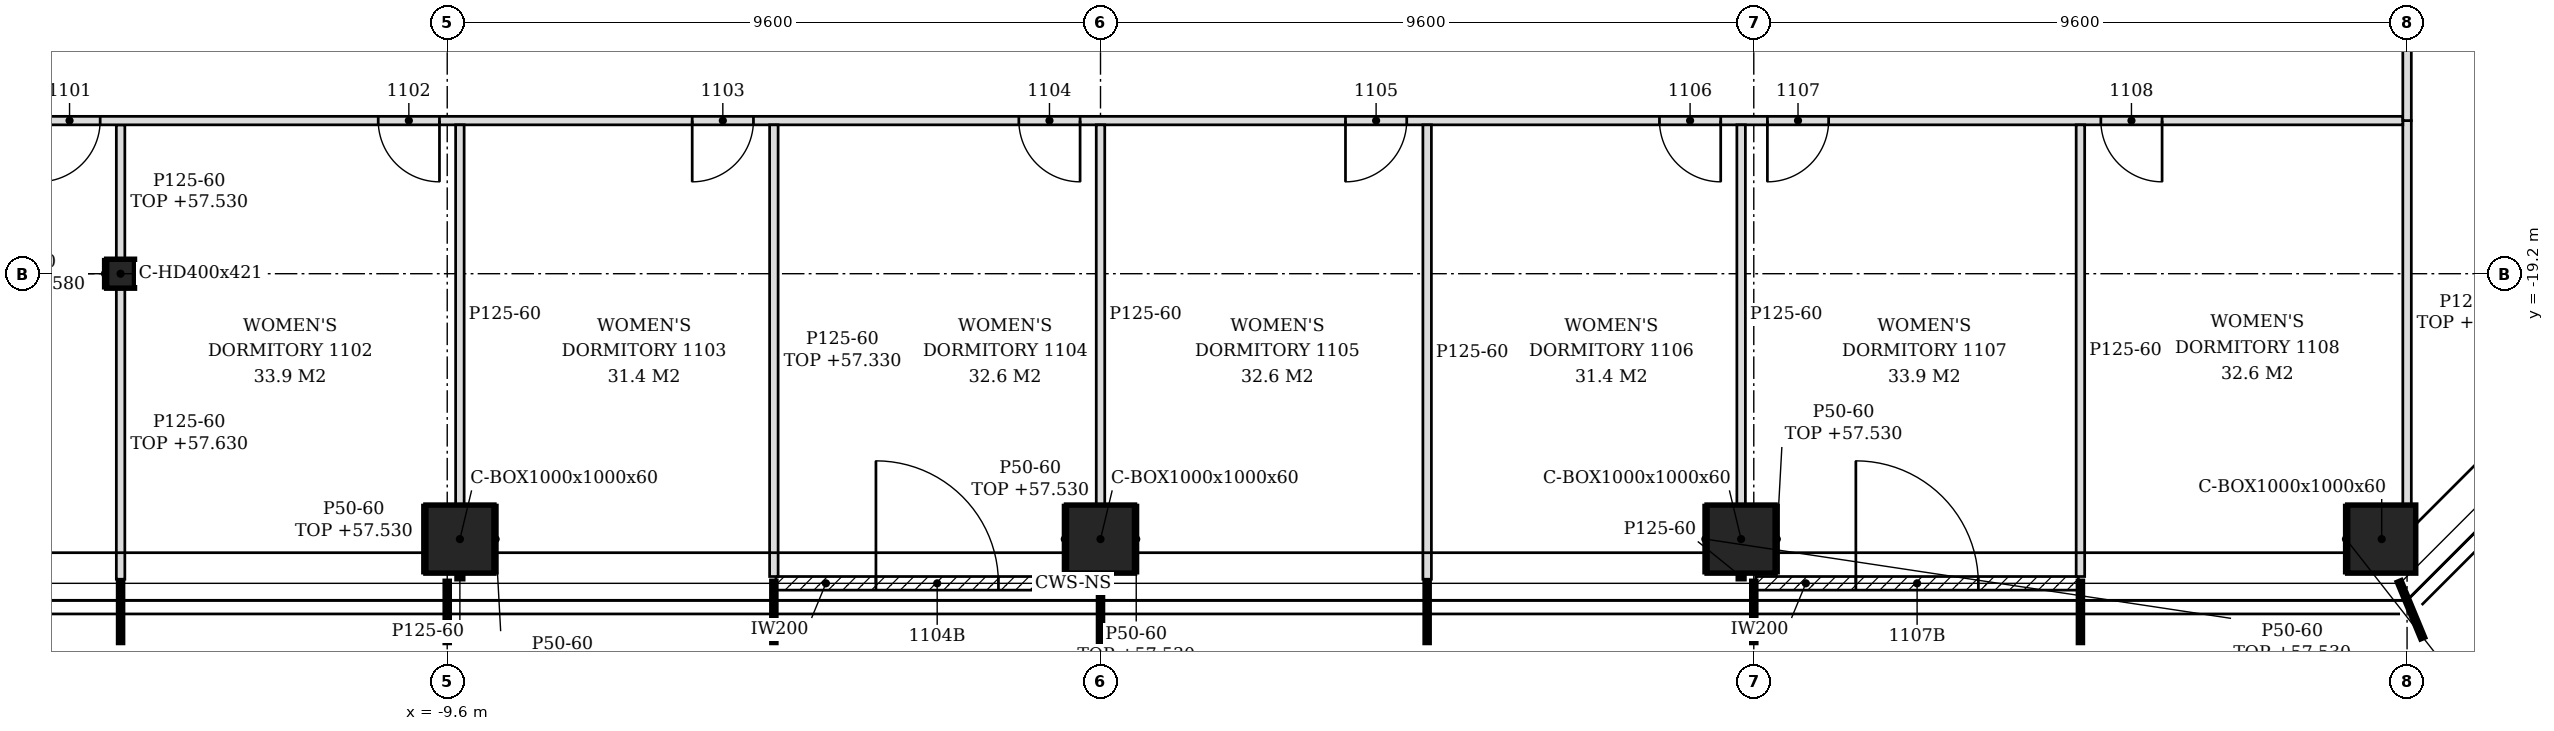
"""IFC4 building model, lengths in metres.
Left out: names, types, materials, properties, quantities, classifications, styles, units other than length and angle.
Written with IfcOpenShell. Run it as: python <this file> out.ifc"""

import sys

from ifc_helpers import new_model, si_unit, direction, frame, frame_2d, origin, origin_2d, place, context, subcontext, project, spatial, polyline, rectangle, hollow_rectangle, i_section, outline, extrude, element, fill, save


model = new_model("IFC4")
c1 = context("Model", 3, precision=1e-05, world=origin(), true_north=direction((0.0, 1.0)))
c2 = subcontext(c1, "Body", "Model", "MODEL_VIEW")
j1 = project(units=[si_unit("LENGTHUNIT", "METRE"), si_unit("PLANEANGLEUNIT", "RADIAN")], contexts=[c1])
p1 = place(None, origin())
s1 = spatial("IfcSite", under=j1, at=p1, CompositionType="ELEMENT")
p2 = place(p1, origin())
s2 = spatial("IfcBuilding", under=s1, at=p2, CompositionType="ELEMENT")
p3 = place(p2, frame((0.0, 0.0, 54.6)))
s3 = spatial("IfcBuildingStorey", under=s2, at=p3, CompositionType="ELEMENT", Elevation=54.6)
for number, where, z_axis, x_axis in (
    (1, (-9.414, -23.1, -0.15), (0.0, 0.0, 1.0), (1.0, 0.0, 0.0)),
    (2, (0.0, -23.1, -0.15), (0.0, 0.0, 1.0), (1.0, 0.0, 0.0)),
    (3, (9.414, -23.1, -0.15), (0.0, 0.0, 1.0), (1.0, 0.0, 0.0)),
    (4, (18.827, -23.1, -0.15), (0.0, 0.0, 1.0), (1.0, 0.0, 0.0)),
):
    element("IfcColumn", number, at=place(p3, frame(where, z_axis=z_axis, x_axis=x_axis)), inside=s3, PredefinedType="COLUMN", context=c2, shape_type="SweptSolid", body=[
        extrude(hollow_rectangle(XDim=1.0, YDim=1.0, WallThickness=0.06, at=origin_2d()), origin(), (0.0, 0.0, 1.0), 3.6),
    ])
p4 = place(p3, frame((-14.4, -19.2, -0.15), z_axis=(0.0, 0.0, 1.0), x_axis=(1.0, 0.0, 0.0)))
e5 = element("IfcColumn", 5, at=p4, inside=s3, PredefinedType="COLUMN", context=c2, shape_type="SweptSolid", body=[
    extrude(i_section(OverallWidth=0.409, OverallDepth=0.425, WebThickness=0.033, FlangeThickness=0.052, FilletRadius=0.015, at=origin_2d()), origin(), (0.0, 0.0, 1.0), 3.6),
])
p5 = place(p3, frame((-4.77, -23.75, 0.0), z_axis=(0.0, 0.0, 1.0), x_axis=(1.0, 0.0, 0.0)))
e6 = element("IfcWall", 6, at=p5, inside=s3, PredefinedType="NOTDEFINED", context=c2, shape_type="SweptSolid", body=[
    extrude(rectangle(XDim=4.74, YDim=0.2, at=frame_2d((2.37, 0.0))), origin(), (0.0, 0.0, 1.0), 3.45),
])
p6 = place(p5, frame((1.47, 0.0, 0.0)))
e7 = element("IfcOpeningElement", 7, at=p6, cuts=e6, PredefinedType="OPENING", context=c2, shape_type="SweptSolid", body=[
    extrude(rectangle(XDim=1.8, YDim=2.4, at=frame_2d((0.9, 1.2))), frame((0.0, 0.11, 0.0), z_axis=(0.0, -1.0, 0.0), x_axis=(1.0, 0.0, 0.0)), (0.0, 0.0, 1.0), 0.22),
])
p7 = place(p3, frame((9.63, -23.75, 0.0), z_axis=(0.0, 0.0, 1.0), x_axis=(1.0, 0.0, 0.0)))
e8 = element("IfcWall", 8, at=p7, inside=s3, PredefinedType="NOTDEFINED", context=c2, shape_type="SweptSolid", body=[
    extrude(rectangle(XDim=4.74, YDim=0.2, at=frame_2d((2.37, 0.0))), origin(), (0.0, 0.0, 1.0), 3.45),
])
p8 = place(p7, frame((1.47, 0.0, 0.0)))
e9 = element("IfcOpeningElement", 9, at=p8, cuts=e8, PredefinedType="OPENING", context=c2, shape_type="SweptSolid", body=[
    extrude(rectangle(XDim=1.8, YDim=2.4, at=frame_2d((0.9, 1.2))), frame((0.0, 0.11, 0.0), z_axis=(0.0, -1.0, 0.0), x_axis=(1.0, 0.0, 0.0)), (0.0, 0.0, 1.0), 0.22),
])
p9 = place(p3, frame((-14.4, -23.69, 0.0), z_axis=(0.0, 0.0, 1.0), x_axis=(0.0, 1.0, 0.0)))
e10 = element("IfcWall", 10, at=p9, inside=s3, PredefinedType="PARTITIONING", context=c2, shape_type="SweptSolid", body=[
    extrude(outline(polyline([(0.0, 0.0), (4.277, 0.0), (4.278, 3.03), (0.74, 3.03), (0.738, 2.93), (0.44, 2.93), (0.438, 3.03), (0.0, 3.03), (0.0, 0.0)])), frame((0.0, 0.062, 0.0), z_axis=(0.0, -1.0, 0.0), x_axis=(1.0, 0.0, 0.0)), (0.0, 0.0, 1.0), 0.125),
])
p10 = place(p3, frame((-9.414, -23.703, 0.0), z_axis=(0.0, 0.0, 1.0), x_axis=(0.0, 1.0, 0.0)))
e11 = element("IfcWall", 11, at=p10, inside=s3, PredefinedType="PARTITIONING", context=c2, shape_type="SweptSolid", body=[
    extrude(rectangle(XDim=0.103, YDim=0.125, at=frame_2d((0.051, 0.0))), origin(), (0.0, 0.0, 1.0), 3.45),
])
p11 = place(p3, frame((-4.8, -23.65, 0.0), z_axis=(0.0, 0.0, 1.0), x_axis=(0.0, 1.0, 0.0)))
e12 = element("IfcWall", 12, at=p11, inside=s3, PredefinedType="PARTITIONING", context=c2, shape_type="SweptSolid", body=[
    extrude(rectangle(XDim=6.637, YDim=0.125, at=frame_2d((3.319, 0.0))), origin(), (0.0, 0.0, 1.0), 2.73),
])
p12 = place(p3, frame((4.8, -23.69, 0.0), z_axis=(0.0, 0.0, 1.0), x_axis=(0.0, 1.0, 0.0)))
e13 = element("IfcWall", 13, at=p12, inside=s3, PredefinedType="PARTITIONING", context=c2, shape_type="SweptSolid", body=[
    extrude(outline(polyline([(0.0, 0.0), (6.677, 0.0), (6.677, 3.45), (4.595, 3.45), (4.593, 2.88), (4.385, 2.88), (4.383, 3.45), (0.74, 3.45), (0.738, 2.93), (0.44, 2.93), (0.438, 3.45), (0.0, 3.45), (0.0, 0.0)])), frame((0.0, 0.062, 0.0), z_axis=(0.0, -1.0, 0.0), x_axis=(1.0, 0.0, 0.0)), (0.0, 0.0, 1.0), 0.125),
])
p13 = place(p3, frame((9.414, -23.703, 0.0), z_axis=(0.0, 0.0, 1.0), x_axis=(0.0, 1.0, 0.0)))
e14 = element("IfcWall", 14, at=p13, inside=s3, PredefinedType="PARTITIONING", context=c2, shape_type="SweptSolid", body=[
    extrude(rectangle(XDim=0.103, YDim=0.125, at=frame_2d((0.051, 0.0))), origin(), (0.0, 0.0, 1.0), 3.45),
])
p14 = place(p3, frame((14.4, -23.65, 0.0), z_axis=(0.0, 0.0, 1.0), x_axis=(0.0, 1.0, 0.0)))
e15 = element("IfcWall", 15, at=p14, inside=s3, PredefinedType="PARTITIONING", context=c2, shape_type="SweptSolid", body=[
    extrude(outline(polyline([(0.0, 0.0), (6.637, 0.0), (6.637, 3.45), (4.555, 3.45), (4.553, 2.88), (4.345, 2.88), (4.343, 3.45), (0.7, 3.45), (0.698, 2.93), (0.4, 2.93), (0.398, 3.45), (0.0, 3.45), (0.0, 0.0)])), frame((0.0, 0.062, 0.0), z_axis=(0.0, -1.0, 0.0), x_axis=(1.0, 0.0, 0.0)), (0.0, 0.0, 1.0), 0.125),
])
p15 = place(p3, frame((-9.414, -22.6, 0.0), z_axis=(0.0, 0.0, 1.0), x_axis=(0.0, 1.0, 0.0)))
e16 = element("IfcWall", 16, at=p15, inside=s3, PredefinedType="PARTITIONING", context=c2, shape_type="SweptSolid", body=[
    extrude(outline(polyline([(0.0, 0.0), (5.588, 0.0), (5.587, 3.45), (3.5, 3.45), (3.498, 2.93), (3.3, 2.93), (3.298, 3.45), (0.0, 3.45), (0.0, 0.0)])), frame((0.0, 0.062, 0.0), z_axis=(0.0, -1.0, 0.0), x_axis=(1.0, 0.0, 0.0)), (0.0, 0.0, 1.0), 0.125),
])
for number, where, z_axis, x_axis in (
    (17, (0.0, -22.6, 0.0), (0.0, 0.0, 1.0), (0.0, 1.0, 0.0)),
    (18, (9.414, -22.6, 0.0), (0.0, 0.0, 1.0), (0.0, 1.0, 0.0)),
):
    element("IfcWall", number, at=place(p3, frame(where, z_axis=z_axis, x_axis=x_axis)), inside=s3, PredefinedType="PARTITIONING", context=c2, shape_type="SweptSolid", body=[
        extrude(outline(polyline([(0.0, 0.0), (5.588, 0.0), (5.587, 3.45), (3.505, 3.45), (3.503, 2.88), (3.295, 2.88), (3.293, 3.45), (0.0, 3.45), (0.0, 0.0)])), frame((0.0, 0.062, 0.0), z_axis=(0.0, -1.0, 0.0), x_axis=(1.0, 0.0, 0.0)), (0.0, 0.0, 1.0), 0.125),
    ])
p16 = place(p3, frame((19.2, -22.6, 0.0), z_axis=(0.0, 0.0, 1.0), x_axis=(0.0, 1.0, 0.0)))
e19 = element("IfcWall", 19, at=p16, inside=s3, PredefinedType="PARTITIONING", context=c2, shape_type="SweptSolid", body=[
    extrude(outline(polyline([(0.0, 0.0), (5.65, 0.0), (5.65, 2.73), (0.43, 2.73), (0.428, 2.63), (0.0, 2.63), (0.0, 0.0)])), frame((0.0, 0.062, 0.0), z_axis=(0.0, -1.0, 0.0), x_axis=(1.0, 0.0, 0.0)), (0.0, 0.0, 1.0), 0.125),
])
p17 = place(p3, frame((-14.4, -18.988, 0.0), z_axis=(0.0, 0.0, 1.0), x_axis=(0.0, 1.0, 0.0)))
e20 = element("IfcWall", 20, at=p17, inside=s3, PredefinedType="PARTITIONING", context=c2, shape_type="SweptSolid", body=[
    extrude(rectangle(XDim=1.975, YDim=0.125, at=frame_2d((0.988, 0.0))), origin(), (0.0, 0.0, 1.0), 2.93),
])
p18 = place(p3, frame((-21.35, -16.95, 0.0), z_axis=(0.0, 0.0, 1.0), x_axis=(1.0, 0.0, 0.0)))
e21 = element("IfcWall", 21, at=p18, inside=s3, PredefinedType="PARTITIONING", context=c2, shape_type="SweptSolid", body=[
    extrude(outline(polyline([(0.0, 0.0), (40.488, 0.0), (40.488, 2.73), (40.4, 2.73), (40.398, 3.45), (28.7, 3.45), (28.698, 2.73), (28.4, 2.73), (28.398, 3.45), (16.7, 3.45), (16.698, 2.73), (16.4, 2.73), (16.398, 3.45), (7.1, 3.45), (7.098, 2.93), (6.8, 2.93), (6.798, 3.45), (0.0, 3.45), (0.0, 0.0)])), frame((0.0, 0.062, 0.0), z_axis=(0.0, -1.0, 0.0), x_axis=(1.0, 0.0, 0.0)), (0.0, 0.0, 1.0), 0.125),
])
p19 = place(p18, frame((5.75, 0.0, 0.0)))
e22 = element("IfcOpeningElement", 22, at=p19, cuts=e21, PredefinedType="OPENING", context=c2, shape_type="SweptSolid", body=[
    extrude(rectangle(XDim=0.9, YDim=2.1, at=frame_2d((0.45, 1.05))), frame((0.0, 0.073, 0.0), z_axis=(0.0, -1.0, 0.0), x_axis=(1.0, 0.0, 0.0)), (0.0, 0.0, 1.0), 0.145),
])
p20 = place(p18, frame((10.736, 0.0, 0.0)))
e23 = element("IfcOpeningElement", 23, at=p20, cuts=e21, PredefinedType="OPENING", context=c2, shape_type="SweptSolid", body=[
    extrude(rectangle(XDim=0.9, YDim=2.1, at=frame_2d((0.45, 1.05))), frame((0.0, 0.073, 0.0), z_axis=(0.0, -1.0, 0.0), x_axis=(1.0, 0.0, 0.0)), (0.0, 0.0, 1.0), 0.145),
])
p21 = place(p18, frame((15.35, 0.0, 0.0)))
e24 = element("IfcOpeningElement", 24, at=p21, cuts=e21, PredefinedType="OPENING", context=c2, shape_type="SweptSolid", body=[
    extrude(rectangle(XDim=0.9, YDim=2.1, at=frame_2d((0.45, 1.05))), frame((0.0, 0.073, 0.0), z_axis=(0.0, -1.0, 0.0), x_axis=(1.0, 0.0, 0.0)), (0.0, 0.0, 1.0), 0.145),
])
p22 = place(p18, frame((20.15, 0.0, 0.0)))
e25 = element("IfcOpeningElement", 25, at=p22, cuts=e21, PredefinedType="OPENING", context=c2, shape_type="SweptSolid", body=[
    extrude(rectangle(XDim=0.9, YDim=2.1, at=frame_2d((0.45, 1.05))), frame((0.0, 0.073, 0.0), z_axis=(0.0, -1.0, 0.0), x_axis=(1.0, 0.0, 0.0)), (0.0, 0.0, 1.0), 0.145),
])
p23 = place(p18, frame((24.95, 0.0, 0.0)))
e26 = element("IfcOpeningElement", 26, at=p23, cuts=e21, PredefinedType="OPENING", context=c2, shape_type="SweptSolid", body=[
    extrude(rectangle(XDim=0.9, YDim=2.1, at=frame_2d((0.45, 1.05))), frame((0.0, 0.073, 0.0), z_axis=(0.0, -1.0, 0.0), x_axis=(1.0, 0.0, 0.0)), (0.0, 0.0, 1.0), 0.145),
])
p24 = place(p18, frame((29.564, 0.0, 0.0)))
e27 = element("IfcOpeningElement", 27, at=p24, cuts=e21, PredefinedType="OPENING", context=c2, shape_type="SweptSolid", body=[
    extrude(rectangle(XDim=0.9, YDim=2.1, at=frame_2d((0.45, 1.05))), frame((0.0, 0.073, 0.0), z_axis=(0.0, -1.0, 0.0), x_axis=(1.0, 0.0, 0.0)), (0.0, 0.0, 1.0), 0.145),
])
p25 = place(p18, frame((31.15, 0.0, 0.0)))
e28 = element("IfcOpeningElement", 28, at=p25, cuts=e21, PredefinedType="OPENING", context=c2, shape_type="SweptSolid", body=[
    extrude(rectangle(XDim=0.9, YDim=2.1, at=frame_2d((0.45, 1.05))), frame((0.0, 0.073, 0.0), z_axis=(0.0, -1.0, 0.0), x_axis=(1.0, 0.0, 0.0)), (0.0, 0.0, 1.0), 0.145),
])
p26 = place(p18, frame((36.05, 0.0, 0.0)))
e29 = element("IfcOpeningElement", 29, at=p26, cuts=e21, PredefinedType="OPENING", context=c2, shape_type="SweptSolid", body=[
    extrude(rectangle(XDim=0.9, YDim=2.1, at=frame_2d((0.45, 1.05))), frame((0.0, 0.073, 0.0), z_axis=(0.0, -1.0, 0.0), x_axis=(1.0, 0.0, 0.0)), (0.0, 0.0, 1.0), 0.145),
])
p27 = place(p3, frame((19.2, -16.95, 0.0), z_axis=(0.0, 0.0, 1.0), x_axis=(0.0, 1.0, 0.0)))
e30 = element("IfcWall", 30, at=p27, inside=s3, PredefinedType="PARTITIONING", context=c2, shape_type="SweptSolid", body=[
    extrude(rectangle(XDim=8.313, YDim=0.125, at=frame_2d((4.156, 0.0))), origin(), (0.0, 0.0, 1.0), 2.73),
])
p28 = place(p27, frame((6.15, 0.0, 0.0)))
e31 = element("IfcOpeningElement", 31, at=p28, cuts=e30, PredefinedType="OPENING", context=c2, shape_type="SweptSolid", body=[
    extrude(rectangle(XDim=0.9, YDim=2.1, at=frame_2d((0.45, 1.05))), frame((0.0, 0.073, 0.0), z_axis=(0.0, -1.0, 0.0), x_axis=(1.0, 0.0, 0.0)), (0.0, 0.0, 1.0), 0.145),
])
p29 = place(p3, frame((-14.629, -19.413, 0.0), z_axis=(0.0, 0.0, 1.0), x_axis=(0.0, 1.0, 0.0)))
e32 = element("IfcWall", 32, at=p29, inside=s3, PredefinedType="PARTITIONING", context=c2, shape_type="SweptSolid", body=[
    extrude(rectangle(XDim=0.425, YDim=0.05, at=frame_2d((0.212, 0.0))), origin(), (0.0, 0.0, 1.0), 2.98),
])
for number, where, z_axis, x_axis in (
    (33, (-9.939, -23.6, 0.0), (0.0, 0.0, 1.0), (0.0, 1.0, 0.0)),
    (34, (-8.889, -23.6, 0.0), (0.0, 0.0, 1.0), (0.0, 1.0, 0.0)),
    (35, (-0.525, -23.6, 0.0), (0.0, 0.0, 1.0), (0.0, 1.0, 0.0)),
    (36, (0.525, -23.6, 0.0), (0.0, 0.0, 1.0), (0.0, 1.0, 0.0)),
    (37, (8.889, -23.6, 0.0), (0.0, 0.0, 1.0), (0.0, 1.0, 0.0)),
    (38, (9.939, -23.6, 0.0), (0.0, 0.0, 1.0), (0.0, 1.0, 0.0)),
    (39, (18.302, -23.6, 0.0), (0.0, 0.0, 1.0), (0.0, 1.0, 0.0)),
):
    element("IfcWall", number, at=place(p3, frame(where, z_axis=z_axis, x_axis=x_axis)), inside=s3, PredefinedType="PARTITIONING", context=c2, shape_type="SweptSolid", body=[
        extrude(rectangle(XDim=1.0, YDim=0.05, at=frame_2d((0.5, 0.0))), origin(), (0.0, 0.0, 1.0), 2.93),
    ])
p30 = place(p6, origin())
e40 = element("IfcDoor", 40, at=p30, inside=s3, OperationType="SINGLE_SWING_LEFT", PredefinedType="DOOR", context=c2, shape_type="SweptSolid", body=[
    extrude(rectangle(XDim=1.8, YDim=2.4, at=frame_2d((0.9, 1.2))), frame((0.0, 0.025, 0.0), z_axis=(0.0, -1.0, 0.0), x_axis=(1.0, 0.0, 0.0)), (0.0, 0.0, 1.0), 0.05),
])
fill(e7, e40)
p31 = place(p8, origin())
e41 = element("IfcDoor", 41, at=p31, inside=s3, OperationType="SINGLE_SWING_LEFT", PredefinedType="DOOR", context=c2, shape_type="SweptSolid", body=[
    extrude(rectangle(XDim=1.8, YDim=2.4, at=frame_2d((0.9, 1.2))), frame((0.0, 0.025, 0.0), z_axis=(0.0, -1.0, 0.0), x_axis=(1.0, 0.0, 0.0)), (0.0, 0.0, 1.0), 0.05),
])
fill(e9, e41)
p32 = place(p19, frame((0.9, 0.0, 0.0), z_axis=(0.0, 0.0, 1.0), x_axis=(-1.0, 0.0, 0.0)))
e42 = element("IfcDoor", 42, at=p32, inside=s3, OperationType="SINGLE_SWING_RIGHT", PredefinedType="DOOR", context=c2, shape_type="SweptSolid", body=[
    extrude(rectangle(XDim=0.9, YDim=2.1, at=frame_2d((0.45, 1.05))), frame((0.0, 0.025, 0.0), z_axis=(0.0, -1.0, 0.0), x_axis=(1.0, 0.0, 0.0)), (0.0, 0.0, 1.0), 0.05),
])
fill(e22, e42)
p33 = place(p20, frame((0.9, 0.0, 0.0), z_axis=(0.0, 0.0, 1.0), x_axis=(-1.0, 0.0, 0.0)))
e43 = element("IfcDoor", 43, at=p33, inside=s3, OperationType="SINGLE_SWING_LEFT", PredefinedType="DOOR", context=c2, shape_type="SweptSolid", body=[
    extrude(rectangle(XDim=0.9, YDim=2.1, at=frame_2d((0.45, 1.05))), frame((0.0, 0.025, 0.0), z_axis=(0.0, -1.0, 0.0), x_axis=(1.0, 0.0, 0.0)), (0.0, 0.0, 1.0), 0.05),
])
fill(e23, e43)
p34 = place(p21, frame((0.9, 0.0, 0.0), z_axis=(0.0, 0.0, 1.0), x_axis=(-1.0, 0.0, 0.0)))
e44 = element("IfcDoor", 44, at=p34, inside=s3, OperationType="SINGLE_SWING_RIGHT", PredefinedType="DOOR", context=c2, shape_type="SweptSolid", body=[
    extrude(rectangle(XDim=0.9, YDim=2.1, at=frame_2d((0.45, 1.05))), frame((0.0, 0.025, 0.0), z_axis=(0.0, -1.0, 0.0), x_axis=(1.0, 0.0, 0.0)), (0.0, 0.0, 1.0), 0.05),
])
fill(e24, e44)
p35 = place(p22, frame((0.9, 0.0, 0.0), z_axis=(0.0, 0.0, 1.0), x_axis=(-1.0, 0.0, 0.0)))
e45 = element("IfcDoor", 45, at=p35, inside=s3, OperationType="SINGLE_SWING_LEFT", PredefinedType="DOOR", context=c2, shape_type="SweptSolid", body=[
    extrude(rectangle(XDim=0.9, YDim=2.1, at=frame_2d((0.45, 1.05))), frame((0.0, 0.025, 0.0), z_axis=(0.0, -1.0, 0.0), x_axis=(1.0, 0.0, 0.0)), (0.0, 0.0, 1.0), 0.05),
])
fill(e25, e45)
p36 = place(p23, frame((0.9, 0.0, 0.0), z_axis=(0.0, 0.0, 1.0), x_axis=(-1.0, 0.0, 0.0)))
e46 = element("IfcDoor", 46, at=p36, inside=s3, OperationType="SINGLE_SWING_RIGHT", PredefinedType="DOOR", context=c2, shape_type="SweptSolid", body=[
    extrude(rectangle(XDim=0.9, YDim=2.1, at=frame_2d((0.45, 1.05))), frame((0.0, 0.025, 0.0), z_axis=(0.0, -1.0, 0.0), x_axis=(1.0, 0.0, 0.0)), (0.0, 0.0, 1.0), 0.05),
])
fill(e26, e46)
p37 = place(p24, frame((0.9, 0.0, 0.0), z_axis=(0.0, 0.0, 1.0), x_axis=(-1.0, 0.0, 0.0)))
e47 = element("IfcDoor", 47, at=p37, inside=s3, OperationType="SINGLE_SWING_LEFT", PredefinedType="DOOR", context=c2, shape_type="SweptSolid", body=[
    extrude(rectangle(XDim=0.9, YDim=2.1, at=frame_2d((0.45, 1.05))), frame((0.0, 0.025, 0.0), z_axis=(0.0, -1.0, 0.0), x_axis=(1.0, 0.0, 0.0)), (0.0, 0.0, 1.0), 0.05),
])
fill(e27, e47)
p38 = place(p25, frame((0.9, 0.0, 0.0), z_axis=(0.0, 0.0, 1.0), x_axis=(-1.0, 0.0, 0.0)))
e48 = element("IfcDoor", 48, at=p38, inside=s3, OperationType="SINGLE_SWING_RIGHT", PredefinedType="DOOR", context=c2, shape_type="SweptSolid", body=[
    extrude(rectangle(XDim=0.9, YDim=2.1, at=frame_2d((0.45, 1.05))), frame((0.0, 0.025, 0.0), z_axis=(0.0, -1.0, 0.0), x_axis=(1.0, 0.0, 0.0)), (0.0, 0.0, 1.0), 0.05),
])
fill(e28, e48)
p39 = place(p26, frame((0.9, 0.0, 0.0), z_axis=(0.0, 0.0, 1.0), x_axis=(-1.0, 0.0, 0.0)))
e49 = element("IfcDoor", 49, at=p39, inside=s3, OperationType="SINGLE_SWING_LEFT", PredefinedType="DOOR", context=c2, shape_type="SweptSolid", body=[
    extrude(rectangle(XDim=0.9, YDim=2.1, at=frame_2d((0.45, 1.05))), frame((0.0, 0.025, 0.0), z_axis=(0.0, -1.0, 0.0), x_axis=(1.0, 0.0, 0.0)), (0.0, 0.0, 1.0), 0.05),
])
fill(e29, e49)
save(model, sys.argv[1])
